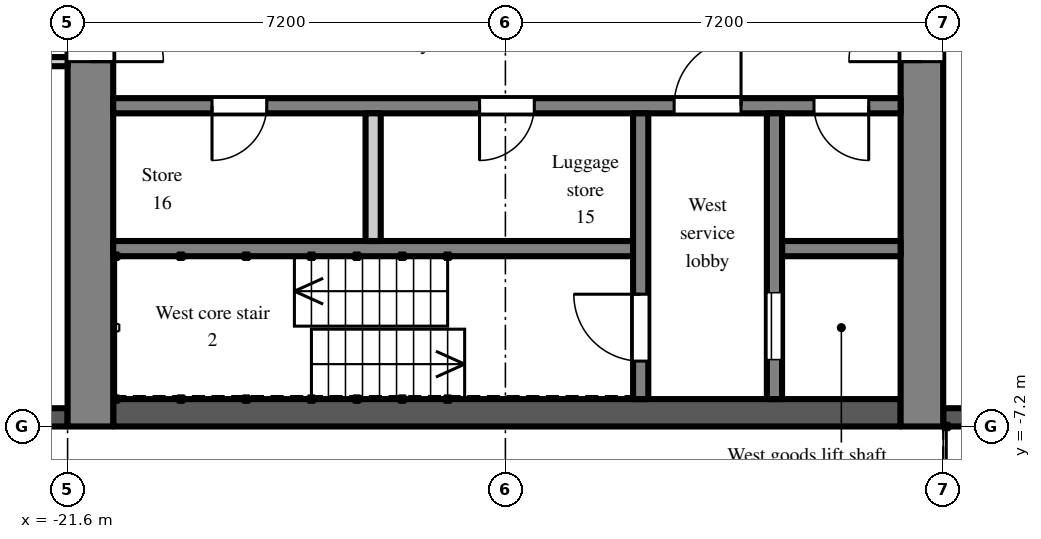
"""IFC4 building model, lengths in metres.
Left out: names, types, materials, properties, quantities, classifications, styles, units other than length and angle.
Written with IfcOpenShell. Run it as: python <this file> out.ifc"""

import sys

from ifc_helpers import new_model, si_unit, direction, frame, frame_2d, origin, place, context, subcontext, project, spatial, rectangle, extrude, element, fill, save


model = new_model("IFC4")
c1 = context("Model", 3, precision=1e-05, world=origin(), true_north=direction((0.0, 1.0)))
c2 = subcontext(c1, "Body", "Model", "MODEL_VIEW")
j1 = project(units=[si_unit("LENGTHUNIT", "METRE"), si_unit("PLANEANGLEUNIT", "RADIAN")], contexts=[c1])
p1 = place(None, origin())
s1 = spatial("IfcSite", under=j1, at=p1, CompositionType="ELEMENT")
p2 = place(p1, origin())
s2 = spatial("IfcBuilding", under=s1, at=p2, CompositionType="ELEMENT")
p3 = place(p2, frame((0.0, 0.0, 138.3)))
s3 = spatial("IfcBuildingStorey", under=s2, at=p3, CompositionType="ELEMENT", Elevation=138.3)
p4 = place(p3, frame((-24.3, -7.05, 0.0), z_axis=(0.0, 0.0, 1.0), x_axis=(1.0, 0.0, 0.0)))
e1 = element("IfcWall", 1, at=p4, inside=s3, PredefinedType="SOLIDWALL", context=c2, shape_type="SweptSolid", body=[
    extrude(rectangle(XDim=2.7, YDim=0.3, at=frame_2d((1.35, 0.0))), origin(), (0.0, 0.0, 1.0), 2.2),
])
p5 = place(p4, frame((0.75, 0.0, 0.2)))
e2 = element("IfcOpeningElement", 2, at=p5, cuts=e1, PredefinedType="OPENING", context=c2, shape_type="SweptSolid", body=[
    extrude(rectangle(XDim=1.2, YDim=1.85, at=frame_2d((0.6, 0.925))), frame((0.0, 0.16, 0.0), z_axis=(0.0, -1.0, 0.0), x_axis=(1.0, 0.0, 0.0)), (0.0, 0.0, 1.0), 0.32),
])
p6 = place(p3, frame((-7.2, -7.05, 0.0), z_axis=(0.0, 0.0, 1.0), x_axis=(1.0, 0.0, 0.0)))
e3 = element("IfcWall", 3, at=p6, inside=s3, PredefinedType="SOLIDWALL", context=c2, shape_type="SweptSolid", body=[
    extrude(rectangle(XDim=3.0, YDim=0.3, at=frame_2d((1.5, 0.0))), origin(), (0.0, 0.0, 1.0), 2.2),
])
p7 = place(p3, frame((-7.55, -7.2, 0.0), z_axis=(0.0, 0.0, 1.0), x_axis=(0.0, 1.0, 0.0)))
e4 = element("IfcWall", 4, at=p7, inside=s3, PredefinedType="SHEAR", context=c2, shape_type="SweptSolid", body=[
    extrude(rectangle(XDim=14.4, YDim=0.7, at=frame_2d((7.2, 0.0))), origin(), (0.0, 0.0, 1.0), 2.6),
])
p8 = place(p7, frame((6.0, 0.0, 0.0)))
e5 = element("IfcOpeningElement", 5, at=p8, cuts=e4, PredefinedType="OPENING", context=c2, shape_type="SweptSolid", body=[
    extrude(rectangle(XDim=2.4, YDim=2.2, at=frame_2d((1.2, 1.1))), frame((0.0, 0.36, 0.0), z_axis=(0.0, -1.0, 0.0), x_axis=(1.0, 0.0, 0.0)), (0.0, 0.0, 1.0), 0.72),
])
p9 = place(p3, frame((-21.225, -7.2, 0.0), z_axis=(0.0, 0.0, 1.0), x_axis=(0.0, 1.0, 0.0)))
e6 = element("IfcWall", 6, at=p9, inside=s3, PredefinedType="SHEAR", context=c2, shape_type="SweptSolid", body=[
    extrude(rectangle(XDim=14.4, YDim=0.75, at=frame_2d((7.2, 0.0))), origin(), (0.0, 0.0, 1.0), 2.6),
])
p10 = place(p9, frame((6.0, 0.0, 0.0)))
e7 = element("IfcOpeningElement", 7, at=p10, cuts=e6, PredefinedType="OPENING", context=c2, shape_type="SweptSolid", body=[
    extrude(rectangle(XDim=2.4, YDim=2.2, at=frame_2d((1.2, 1.1))), frame((0.0, 0.385, 0.0), z_axis=(0.0, -1.0, 0.0), x_axis=(1.0, 0.0, 0.0)), (0.0, 0.0, 1.0), 0.77),
])
p11 = place(p3, frame((-7.9, -6.975, 0.0), z_axis=(0.0, 0.0, 1.0), x_axis=(-1.0, 0.0, 0.0)))
e8 = element("IfcWall", 8, at=p11, inside=s3, PredefinedType="SHEAR", context=c2, shape_type="SweptSolid", body=[
    extrude(rectangle(XDim=12.95, YDim=0.45, at=frame_2d((6.475, 0.0))), origin(), (0.0, 0.0, 1.0), 2.6),
])
p12 = place(p3, frame((-7.9, -1.925, 0.0), z_axis=(0.0, 0.0, 1.0), x_axis=(-1.0, 0.0, 0.0)))
e9 = element("IfcWall", 9, at=p12, inside=s3, PredefinedType="SHEAR", context=c2, shape_type="SweptSolid", body=[
    extrude(rectangle(XDim=12.95, YDim=0.25, at=frame_2d((6.475, 0.0))), origin(), (0.0, 0.0, 1.0), 2.6),
])
p13 = place(p12, frame((0.525, 0.0, 0.0)))
e10 = element("IfcOpeningElement", 10, at=p13, cuts=e9, PredefinedType="OPENING", context=c2, shape_type="SweptSolid", body=[
    extrude(rectangle(XDim=0.9, YDim=2.1, at=frame_2d((0.45, 1.05))), frame((0.0, 0.135, 0.0), z_axis=(0.0, -1.0, 0.0), x_axis=(1.0, 0.0, 0.0)), (0.0, 0.0, 1.0), 0.27),
])
p14 = place(p12, frame((2.625, 0.0, 0.0)))
e11 = element("IfcOpeningElement", 11, at=p14, cuts=e9, PredefinedType="OPENING", context=c2, shape_type="SweptSolid", body=[
    extrude(rectangle(XDim=1.1, YDim=2.1, at=frame_2d((0.55, 1.05))), frame((0.0, 0.135, 0.0), z_axis=(0.0, -1.0, 0.0), x_axis=(1.0, 0.0, 0.0)), (0.0, 0.0, 1.0), 0.27),
])
p15 = place(p12, frame((6.025, 0.0, 0.0)))
e12 = element("IfcOpeningElement", 12, at=p15, cuts=e9, PredefinedType="OPENING", context=c2, shape_type="SweptSolid", body=[
    extrude(rectangle(XDim=0.9, YDim=2.1, at=frame_2d((0.45, 1.05))), frame((0.0, 0.135, 0.0), z_axis=(0.0, -1.0, 0.0), x_axis=(1.0, 0.0, 0.0)), (0.0, 0.0, 1.0), 0.27),
])
p16 = place(p12, frame((10.425, 0.0, 0.0)))
e13 = element("IfcOpeningElement", 13, at=p16, cuts=e9, PredefinedType="OPENING", context=c2, shape_type="SweptSolid", body=[
    extrude(rectangle(XDim=0.9, YDim=2.1, at=frame_2d((0.45, 1.05))), frame((0.0, 0.135, 0.0), z_axis=(0.0, -1.0, 0.0), x_axis=(1.0, 0.0, 0.0)), (0.0, 0.0, 1.0), 0.27),
])
p17 = place(p3, frame((-7.9, -4.275, 0.0), z_axis=(0.0, 0.0, 1.0), x_axis=(-1.0, 0.0, 0.0)))
e14 = element("IfcWall", 14, at=p17, inside=s3, PredefinedType="SHEAR", context=c2, shape_type="SweptSolid", body=[
    extrude(rectangle(XDim=1.95, YDim=0.25, at=frame_2d((0.975, 0.0))), origin(), (0.0, 0.0, 1.0), 2.6),
])
p18 = place(p3, frame((-12.3, -4.275, 0.0), z_axis=(0.0, 0.0, 1.0), x_axis=(-1.0, 0.0, 0.0)))
e15 = element("IfcWall", 15, at=p18, inside=s3, PredefinedType="SHEAR", context=c2, shape_type="SweptSolid", body=[
    extrude(rectangle(XDim=8.55, YDim=0.25, at=frame_2d((4.275, 0.0))), origin(), (0.0, 0.0, 1.0), 2.6),
])
p19 = place(p3, frame((-9.975, -2.05, 0.0), z_axis=(0.0, 0.0, 1.0), x_axis=(0.0, -1.0, 0.0)))
e16 = element("IfcWall", 16, at=p19, inside=s3, PredefinedType="SHEAR", context=c2, shape_type="SweptSolid", body=[
    extrude(rectangle(XDim=4.7, YDim=0.25, at=frame_2d((2.35, 0.0))), origin(), (0.0, 0.0, 1.0), 2.6),
])
p20 = place(p19, frame((2.95, 0.0, 0.0)))
e17 = element("IfcOpeningElement", 17, at=p20, cuts=e16, PredefinedType="OPENING", context=c2, shape_type="SweptSolid", body=[
    extrude(rectangle(XDim=1.1, YDim=2.1, at=frame_2d((0.55, 1.05))), frame((0.0, 0.135, 0.0), z_axis=(0.0, -1.0, 0.0), x_axis=(1.0, 0.0, 0.0)), (0.0, 0.0, 1.0), 0.27),
])
p21 = place(p3, frame((-12.175, -2.05, 0.0), z_axis=(0.0, 0.0, 1.0), x_axis=(0.0, -1.0, 0.0)))
e18 = element("IfcWall", 18, at=p21, inside=s3, PredefinedType="SHEAR", context=c2, shape_type="SweptSolid", body=[
    extrude(rectangle(XDim=4.7, YDim=0.25, at=frame_2d((2.35, 0.0))), origin(), (0.0, 0.0, 1.0), 2.6),
])
p22 = place(p21, frame((2.975, 0.0, 0.0)))
e19 = element("IfcOpeningElement", 19, at=p22, cuts=e18, PredefinedType="OPENING", context=c2, shape_type="SweptSolid", body=[
    extrude(rectangle(XDim=1.1, YDim=2.1, at=frame_2d((0.55, 1.05))), frame((0.0, 0.135, 0.0), z_axis=(0.0, -1.0, 0.0), x_axis=(1.0, 0.0, 0.0)), (0.0, 0.0, 1.0), 0.27),
])
p23 = place(p3, frame((-16.575, -2.05, 0.0), z_axis=(0.0, 0.0, 1.0), x_axis=(0.0, -1.0, 0.0)))
e20 = element("IfcWall", 20, at=p23, inside=s3, PredefinedType="PARTITIONING", context=c2, shape_type="SweptSolid", body=[
    extrude(rectangle(XDim=2.1, YDim=0.25, at=frame_2d((1.05, 0.0))), origin(), (0.0, 0.0, 1.0), 2.6),
])
p24 = place(p3, frame((-36.5, -1.2, 0.0), z_axis=(0.0, 0.0, 1.0), x_axis=(1.0, 0.0, 0.0)))
e21 = element("IfcWall", 21, at=p24, inside=s3, PredefinedType="PARTITIONING", context=c2, shape_type="SweptSolid", body=[
    extrude(rectangle(XDim=14.9, YDim=0.15, at=frame_2d((7.45, 0.0))), origin(), (0.0, 0.0, 1.0), 2.6),
])
p25 = place(p24, frame((7.9, 0.0, 0.0)))
e22 = element("IfcOpeningElement", 22, at=p25, cuts=e21, PredefinedType="OPENING", context=c2, shape_type="SweptSolid", body=[
    extrude(rectangle(XDim=1.0, YDim=2.1, at=frame_2d((0.5, 1.05))), frame((0.0, 0.085, 0.0), z_axis=(0.0, -1.0, 0.0), x_axis=(1.0, 0.0, 0.0)), (0.0, 0.0, 1.0), 0.17),
])
p26 = place(p24, frame((6.35, 0.0, 0.0)))
e23 = element("IfcOpeningElement", 23, at=p26, cuts=e21, PredefinedType="OPENING", context=c2, shape_type="SweptSolid", body=[
    extrude(rectangle(XDim=0.9, YDim=2.1, at=frame_2d((0.45, 1.05))), frame((0.0, 0.085, 0.0), z_axis=(0.0, -1.0, 0.0), x_axis=(1.0, 0.0, 0.0)), (0.0, 0.0, 1.0), 0.17),
])
p27 = place(p24, frame((4.55, 0.0, 0.0)))
e24 = element("IfcOpeningElement", 24, at=p27, cuts=e21, PredefinedType="OPENING", context=c2, shape_type="SweptSolid", body=[
    extrude(rectangle(XDim=0.9, YDim=2.1, at=frame_2d((0.45, 1.05))), frame((0.0, 0.085, 0.0), z_axis=(0.0, -1.0, 0.0), x_axis=(1.0, 0.0, 0.0)), (0.0, 0.0, 1.0), 0.17),
])
p28 = place(p24, frame((1.15, 0.0, 0.0)))
e25 = element("IfcOpeningElement", 25, at=p28, cuts=e21, PredefinedType="OPENING", context=c2, shape_type="SweptSolid", body=[
    extrude(rectangle(XDim=1.8, YDim=2.1, at=frame_2d((0.9, 1.05))), frame((0.0, 0.085, 0.0), z_axis=(0.0, -1.0, 0.0), x_axis=(1.0, 0.0, 0.0)), (0.0, 0.0, 1.0), 0.17),
])
p29 = place(p20, origin())
e26 = element("IfcDoor", 26, at=p29, inside=s3, OperationType="SLIDING_TO_LEFT", PredefinedType="DOOR", context=c2, shape_type="SweptSolid", body=[
    extrude(rectangle(XDim=1.1, YDim=2.1, at=frame_2d((0.55, 1.05))), frame((0.0, 0.025, 0.0), z_axis=(0.0, -1.0, 0.0), x_axis=(1.0, 0.0, 0.0)), (0.0, 0.0, 1.0), 0.05),
])
fill(e17, e26)
p30 = place(p22, frame((1.1, 0.0, 0.0), z_axis=(0.0, 0.0, 1.0), x_axis=(-1.0, 0.0, 0.0)))
e27 = element("IfcDoor", 27, at=p30, inside=s3, OperationType="SINGLE_SWING_RIGHT", PredefinedType="DOOR", context=c2, shape_type="SweptSolid", body=[
    extrude(rectangle(XDim=1.1, YDim=2.1, at=frame_2d((0.55, 1.05))), frame((0.0, 0.025, 0.0), z_axis=(0.0, -1.0, 0.0), x_axis=(1.0, 0.0, 0.0)), (0.0, 0.0, 1.0), 0.05),
])
fill(e19, e27)
p31 = place(p13, origin())
e28 = element("IfcDoor", 28, at=p31, inside=s3, OperationType="SINGLE_SWING_LEFT", PredefinedType="DOOR", context=c2, shape_type="SweptSolid", body=[
    extrude(rectangle(XDim=0.9, YDim=2.1, at=frame_2d((0.45, 1.05))), frame((0.0, 0.025, 0.0), z_axis=(0.0, -1.0, 0.0), x_axis=(1.0, 0.0, 0.0)), (0.0, 0.0, 1.0), 0.05),
])
fill(e10, e28)
p32 = place(p14, frame((1.1, 0.0, 0.0), z_axis=(0.0, 0.0, 1.0), x_axis=(-1.0, 0.0, 0.0)))
e29 = element("IfcDoor", 29, at=p32, inside=s3, OperationType="SINGLE_SWING_RIGHT", PredefinedType="DOOR", context=c2, shape_type="SweptSolid", body=[
    extrude(rectangle(XDim=1.1, YDim=2.1, at=frame_2d((0.55, 1.05))), frame((0.0, 0.025, 0.0), z_axis=(0.0, -1.0, 0.0), x_axis=(1.0, 0.0, 0.0)), (0.0, 0.0, 1.0), 0.05),
])
fill(e11, e29)
p33 = place(p8, origin())
e30 = element("IfcDoor", 30, at=p33, inside=s3, OperationType="DOUBLE_DOOR_DOUBLE_SWING", PredefinedType="DOOR", context=c2, shape_type="SweptSolid", body=[
    extrude(rectangle(XDim=2.4, YDim=2.2, at=frame_2d((1.2, 1.1))), frame((0.0, 0.025, 0.0), z_axis=(0.0, -1.0, 0.0), x_axis=(1.0, 0.0, 0.0)), (0.0, 0.0, 1.0), 0.05),
])
fill(e5, e30)
p34 = place(p10, frame((2.4, 0.0, 0.0), z_axis=(0.0, 0.0, 1.0), x_axis=(-1.0, 0.0, 0.0)))
e31 = element("IfcDoor", 31, at=p34, inside=s3, OperationType="DOUBLE_DOOR_DOUBLE_SWING", PredefinedType="DOOR", context=c2, shape_type="SweptSolid", body=[
    extrude(rectangle(XDim=2.4, YDim=2.2, at=frame_2d((1.2, 1.1))), frame((0.0, 0.025, 0.0), z_axis=(0.0, -1.0, 0.0), x_axis=(1.0, 0.0, 0.0)), (0.0, 0.0, 1.0), 0.05),
])
fill(e7, e31)
p35 = place(p15, origin())
e32 = element("IfcDoor", 32, at=p35, inside=s3, OperationType="SINGLE_SWING_RIGHT", PredefinedType="DOOR", context=c2, shape_type="SweptSolid", body=[
    extrude(rectangle(XDim=0.9, YDim=2.1, at=frame_2d((0.45, 1.05))), frame((0.0, 0.025, 0.0), z_axis=(0.0, -1.0, 0.0), x_axis=(1.0, 0.0, 0.0)), (0.0, 0.0, 1.0), 0.05),
])
fill(e12, e32)
p36 = place(p16, origin())
e33 = element("IfcDoor", 33, at=p36, inside=s3, OperationType="SINGLE_SWING_RIGHT", PredefinedType="DOOR", context=c2, shape_type="SweptSolid", body=[
    extrude(rectangle(XDim=0.9, YDim=2.1, at=frame_2d((0.45, 1.05))), frame((0.0, 0.025, 0.0), z_axis=(0.0, -1.0, 0.0), x_axis=(1.0, 0.0, 0.0)), (0.0, 0.0, 1.0), 0.05),
])
fill(e13, e33)
save(model, sys.argv[1])
